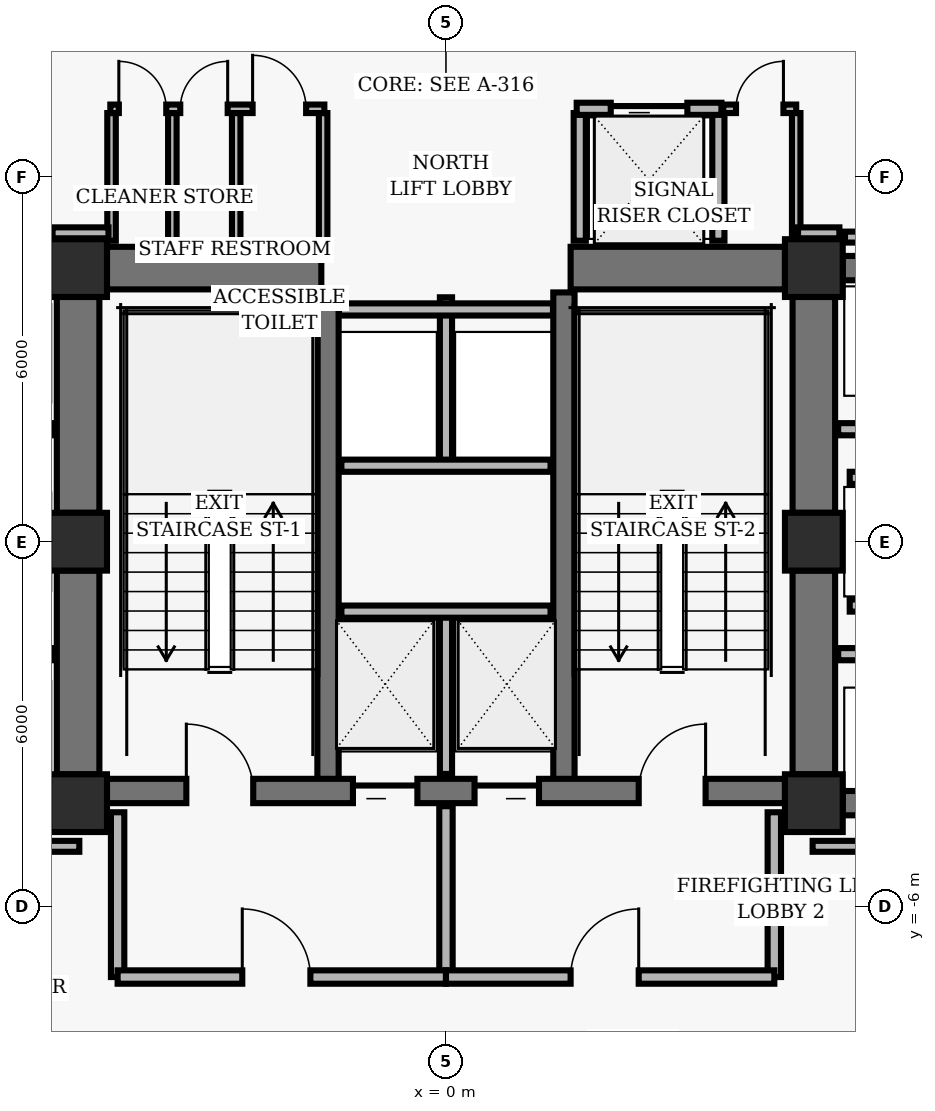
"""IFC4 building model, lengths in metres.
Left out: names, types, materials, properties, quantities, classifications, styles, units other than length and angle.
Written with IfcOpenShell. Run it as: python <this file> out.ifc"""

import sys

from ifc_helpers import new_model, si_unit, direction, frame, frame_2d, origin, origin_2d, place, context, subcontext, project, spatial, rectangle, hollow_rectangle, extrude, element, fill, save


model = new_model("IFC4")
c1 = context("Model", 3, precision=1e-05, world=origin(), true_north=direction((0.0, 1.0)))
c2 = subcontext(c1, "Body", "Model", "MODEL_VIEW")
j1 = project(units=[si_unit("LENGTHUNIT", "METRE"), si_unit("PLANEANGLEUNIT", "RADIAN")], contexts=[c1])
p1 = place(None, origin())
s1 = spatial("IfcSite", under=j1, at=p1, CompositionType="ELEMENT")
p2 = place(p1, origin())
s2 = spatial("IfcBuilding", under=s1, at=p2, CompositionType="ELEMENT")
p3 = place(p2, frame((0.0, 0.0, 52.96)))
s3 = spatial("IfcBuildingStorey", under=s2, at=p3, CompositionType="ELEMENT", Elevation=52.96)
for number, where, z_axis, x_axis in (
    (1, (-6.05, 4.5, 0.0), (0.0, 0.0, 1.0), (1.0, 0.0, 0.0)),
    (2, (6.05, 4.5, 0.0), (0.0, 0.0, 1.0), (1.0, 0.0, 0.0)),
    (3, (-6.05, 0.0, 0.0), (0.0, 0.0, 1.0), (1.0, 0.0, 0.0)),
    (4, (6.05, 0.0, 0.0), (0.0, 0.0, 1.0), (1.0, 0.0, 0.0)),
    (5, (-6.05, -4.3, 0.0), (0.0, 0.0, 1.0), (1.0, 0.0, 0.0)),
    (6, (6.05, -4.3, 0.0), (0.0, 0.0, 1.0), (1.0, 0.0, 0.0)),
):
    element("IfcColumn", number, at=place(p3, frame(where, z_axis=z_axis, x_axis=x_axis)), inside=s3, PredefinedType="COLUMN", context=c2, shape_type="SweptSolid", body=[
        extrude(hollow_rectangle(XDim=0.95, YDim=0.95, WallThickness=0.06, InnerFilletRadius=0.02, OuterFilletRadius=0.04, at=origin_2d()), origin(), (0.0, 0.0, 1.0), 3.36),
    ])
p4 = place(p3, frame((-6.05, 0.475, 0.0), z_axis=(0.0, 0.0, 1.0), x_axis=(0.0, 1.0, 0.0)))
e7 = element("IfcWall", 7, at=p4, inside=s3, PredefinedType="SHEAR", context=c2, shape_type="SweptSolid", body=[
    extrude(rectangle(XDim=3.55, YDim=0.7, at=frame_2d((1.775, 0.0))), origin(), (0.0, 0.0, 1.0), 3.098),
])
p5 = place(p3, frame((-6.05, -3.825, 0.0), z_axis=(0.0, 0.0, 1.0), x_axis=(0.0, 1.0, 0.0)))
e8 = element("IfcWall", 8, at=p5, inside=s3, PredefinedType="SHEAR", context=c2, shape_type="SweptSolid", body=[
    extrude(rectangle(XDim=3.35, YDim=0.7, at=frame_2d((1.675, 0.0))), origin(), (0.0, 0.0, 1.0), 3.098),
])
p6 = place(p3, frame((6.05, 0.475, 0.0), z_axis=(0.0, 0.0, 1.0), x_axis=(0.0, 1.0, 0.0)))
e9 = element("IfcWall", 9, at=p6, inside=s3, PredefinedType="SHEAR", context=c2, shape_type="SweptSolid", body=[
    extrude(rectangle(XDim=3.55, YDim=0.7, at=frame_2d((1.775, 0.0))), origin(), (0.0, 0.0, 1.0), 3.098),
])
p7 = place(p3, frame((6.05, -3.825, 0.0), z_axis=(0.0, 0.0, 1.0), x_axis=(0.0, 1.0, 0.0)))
e10 = element("IfcWall", 10, at=p7, inside=s3, PredefinedType="SHEAR", context=c2, shape_type="SweptSolid", body=[
    extrude(rectangle(XDim=3.35, YDim=0.7, at=frame_2d((1.675, 0.0))), origin(), (0.0, 0.0, 1.0), 3.098),
])
for number, where, z_axis, x_axis in (
    (11, (-1.94, -4.1, 0.0), (0.0, 0.0, 1.0), (0.0, 1.0, 0.0)),
    (12, (1.94, -4.1, 0.0), (0.0, 0.0, 1.0), (0.0, 1.0, 0.0)),
):
    element("IfcWall", number, at=place(p3, frame(where, z_axis=z_axis, x_axis=x_axis)), inside=s3, PredefinedType="SHEAR", context=c2, shape_type="SweptSolid", body=[
        extrude(rectangle(XDim=8.2, YDim=0.35, at=frame_2d((4.1, 0.0))), origin(), (0.0, 0.0, 1.0), 3.098),
    ])
p8 = place(p3, frame((-5.575, -4.1, 0.0), z_axis=(0.0, 0.0, 1.0), x_axis=(1.0, 0.0, 0.0)))
e13 = element("IfcWall", 13, at=p8, inside=s3, PredefinedType="SHEAR", context=c2, shape_type="SweptSolid", body=[
    extrude(rectangle(XDim=11.15, YDim=0.4, at=frame_2d((5.575, 0.0))), origin(), (0.0, 0.0, 1.0), 3.098),
])
p9 = place(p8, frame((1.305, 0.0, 0.0)))
e14 = element("IfcOpeningElement", 14, at=p9, cuts=e13, PredefinedType="OPENING", context=c2, shape_type="SweptSolid", body=[
    extrude(rectangle(XDim=1.1, YDim=2.04, at=frame_2d((0.55, 1.02))), frame((0.0, 0.21, 0.0), z_axis=(0.0, -1.0, 0.0), x_axis=(1.0, 0.0, 0.0)), (0.0, 0.0, 1.0), 0.42),
])
p10 = place(p8, frame((8.745, 0.0, 0.0)))
e15 = element("IfcOpeningElement", 15, at=p10, cuts=e13, PredefinedType="OPENING", context=c2, shape_type="SweptSolid", body=[
    extrude(rectangle(XDim=1.1, YDim=2.04, at=frame_2d((0.55, 1.02))), frame((0.0, 0.21, 0.0), z_axis=(0.0, -1.0, 0.0), x_axis=(1.0, 0.0, 0.0)), (0.0, 0.0, 1.0), 0.42),
])
p11 = place(p8, frame((4.045, 0.0, 0.0)))
e16 = element("IfcOpeningElement", 16, at=p11, cuts=e13, PredefinedType="OPENING", context=c2, shape_type="SweptSolid", body=[
    extrude(rectangle(XDim=1.06, YDim=2.04, at=frame_2d((0.53, 1.02))), frame((0.0, 0.21, 0.0), z_axis=(0.0, -1.0, 0.0), x_axis=(1.0, 0.0, 0.0)), (0.0, 0.0, 1.0), 0.42),
])
p12 = place(p8, frame((6.045, 0.0, 0.0)))
e17 = element("IfcOpeningElement", 17, at=p12, cuts=e13, PredefinedType="OPENING", context=c2, shape_type="SweptSolid", body=[
    extrude(rectangle(XDim=1.06, YDim=2.04, at=frame_2d((0.53, 1.02))), frame((0.0, 0.21, 0.0), z_axis=(0.0, -1.0, 0.0), x_axis=(1.0, 0.0, 0.0)), (0.0, 0.0, 1.0), 0.42),
])
for number, where, z_axis, x_axis in (
    (18, (-5.575, 4.5, 0.0), (0.0, 0.0, 1.0), (1.0, 0.0, 0.0)),
    (19, (2.05, 4.5, 0.0), (0.0, 0.0, 1.0), (1.0, 0.0, 0.0)),
):
    element("IfcWall", number, at=place(p3, frame(where, z_axis=z_axis, x_axis=x_axis)), inside=s3, PredefinedType="SHEAR", context=c2, shape_type="SweptSolid", body=[
        extrude(rectangle(XDim=3.525, YDim=0.7, at=frame_2d((1.762, 0.0))), origin(), (0.0, 0.0, 1.0), 3.098),
    ])
for number, where, z_axis, x_axis in (
    (20, (6.525, 4.5, 0.0), (0.0, 0.0, 1.0), (1.0, 0.0, 0.0)),
    (21, (6.525, -4.3, 0.0), (0.0, 0.0, 1.0), (1.0, 0.0, 0.0)),
):
    element("IfcWall", number, at=place(p3, frame(where, z_axis=z_axis, x_axis=x_axis)), inside=s3, PredefinedType="SHEAR", context=c2, shape_type="SweptSolid", body=[
        extrude(rectangle(XDim=1.95, YDim=0.4, at=frame_2d((0.975, 0.0))), origin(), (0.0, 0.0, 1.0), 3.098),
    ])
p13 = place(p3, frame((0.0, -3.82, 0.0), z_axis=(0.0, 0.0, 1.0), x_axis=(0.0, 1.0, 0.0)))
e22 = element("IfcWall", 22, at=p13, inside=s3, PredefinedType="PARTITIONING", context=c2, shape_type="SweptSolid", body=[
    extrude(rectangle(XDim=2.67, YDim=0.2, at=frame_2d((1.335, 0.0))), origin(), (0.0, 0.0, 1.0), 3.073),
])
p14 = place(p3, frame((-1.72, -1.15, 0.0), z_axis=(0.0, 0.0, 1.0), x_axis=(1.0, 0.0, 0.0)))
e23 = element("IfcWall", 23, at=p14, inside=s3, PredefinedType="PARTITIONING", context=c2, shape_type="SweptSolid", body=[
    extrude(rectangle(XDim=3.44, YDim=0.2, at=frame_2d((1.72, 0.0))), origin(), (0.0, 0.0, 1.0), 3.073),
])
for number, where, z_axis, x_axis in (
    (24, (-5.4, -7.16, 0.0), (0.0, 0.0, 1.0), (0.0, 1.0, 0.0)),
    (25, (5.4, -7.16, 0.0), (0.0, 0.0, 1.0), (0.0, 1.0, 0.0)),
):
    element("IfcWall", number, at=place(p3, frame(where, z_axis=z_axis, x_axis=x_axis)), inside=s3, PredefinedType="PARTITIONING", context=c2, shape_type="SweptSolid", body=[
        extrude(rectangle(XDim=2.71, YDim=0.22, at=frame_2d((1.355, 0.0))), origin(), (0.0, 0.0, 1.0), 3.073),
    ])
p15 = place(p3, frame((0.0, -7.16, 0.0), z_axis=(0.0, 0.0, 1.0), x_axis=(0.0, 1.0, 0.0)))
e26 = element("IfcWall", 26, at=p15, inside=s3, PredefinedType="PARTITIONING", context=c2, shape_type="SweptSolid", body=[
    extrude(rectangle(XDim=2.81, YDim=0.22, at=frame_2d((1.405, 0.0))), origin(), (0.0, 0.0, 1.0), 3.073),
])
p16 = place(p3, frame((-5.4, -7.16, 0.0), z_axis=(0.0, 0.0, 1.0), x_axis=(1.0, 0.0, 0.0)))
e27 = element("IfcWall", 27, at=p16, inside=s3, PredefinedType="PARTITIONING", context=c2, shape_type="SweptSolid", body=[
    extrude(rectangle(XDim=5.4, YDim=0.22, at=frame_2d((2.7, 0.0))), origin(), (0.0, 0.0, 1.0), 2.587),
])
p17 = place(p16, frame((2.05, 0.0, 0.0)))
e28 = element("IfcOpeningElement", 28, at=p17, cuts=e27, PredefinedType="OPENING", context=c2, shape_type="SweptSolid", body=[
    extrude(rectangle(XDim=1.12, YDim=2.02, at=frame_2d((0.56, 1.01))), frame((0.0, 0.12, 0.0), z_axis=(0.0, -1.0, 0.0), x_axis=(1.0, 0.0, 0.0)), (0.0, 0.0, 1.0), 0.24),
])
p18 = place(p3, frame((0.0, -7.16, 0.0), z_axis=(0.0, 0.0, 1.0), x_axis=(1.0, 0.0, 0.0)))
e29 = element("IfcWall", 29, at=p18, inside=s3, PredefinedType="PARTITIONING", context=c2, shape_type="SweptSolid", body=[
    extrude(rectangle(XDim=5.4, YDim=0.22, at=frame_2d((2.7, 0.0))), origin(), (0.0, 0.0, 1.0), 2.587),
])
p19 = place(p18, frame((2.05, 0.0, 0.0)))
e30 = element("IfcOpeningElement", 30, at=p19, cuts=e29, PredefinedType="OPENING", context=c2, shape_type="SweptSolid", body=[
    extrude(rectangle(XDim=1.12, YDim=2.02, at=frame_2d((0.56, 1.01))), frame((0.0, 0.12, 0.0), z_axis=(0.0, -1.0, 0.0), x_axis=(1.0, 0.0, 0.0)), (0.0, 0.0, 1.0), 0.24),
])
p20 = place(p3, frame((0.0, 1.25, 0.0), z_axis=(0.0, 0.0, 1.0), x_axis=(0.0, 1.0, 0.0)))
e31 = element("IfcWall", 31, at=p20, inside=s3, PredefinedType="PARTITIONING", context=c2, shape_type="SweptSolid", body=[
    extrude(rectangle(XDim=2.77, YDim=0.2, at=frame_2d((1.385, 0.0))), origin(), (0.0, 0.0, 1.0), 3.073),
])
p21 = place(p3, frame((-1.72, 1.25, 0.0), z_axis=(0.0, 0.0, 1.0), x_axis=(1.0, 0.0, 0.0)))
e32 = element("IfcWall", 32, at=p21, inside=s3, PredefinedType="PARTITIONING", context=c2, shape_type="SweptSolid", body=[
    extrude(rectangle(XDim=3.44, YDim=0.2, at=frame_2d((1.72, 0.0))), origin(), (0.0, 0.0, 1.0), 3.073),
])
p22 = place(p3, frame((-1.76, 3.82, 0.0), z_axis=(0.0, 0.0, 1.0), x_axis=(1.0, 0.0, 0.0)))
e33 = element("IfcWall", 33, at=p22, inside=s3, PredefinedType="PARTITIONING", context=c2, shape_type="SweptSolid", body=[
    extrude(rectangle(XDim=3.52, YDim=0.2, at=frame_2d((1.76, 0.0))), origin(), (0.0, 0.0, 1.0), 3.073),
])
for number, where, z_axis, x_axis in (
    (34, (2.2, 4.95, 0.0), (0.0, 0.0, 1.0), (0.0, 1.0, 0.0)),
    (35, (4.48, 4.95, 0.0), (0.0, 0.0, 1.0), (0.0, 1.0, 0.0)),
):
    element("IfcWall", number, at=place(p3, frame(where, z_axis=z_axis, x_axis=x_axis)), inside=s3, PredefinedType="PARTITIONING", context=c2, shape_type="SweptSolid", body=[
        extrude(rectangle(XDim=2.1, YDim=0.2, at=frame_2d((1.05, 0.0))), origin(), (0.0, 0.0, 1.0), 3.073),
    ])
p23 = place(p3, frame((2.15, 7.12, 0.0), z_axis=(0.0, 0.0, 1.0), x_axis=(1.0, 0.0, 0.0)))
e36 = element("IfcWall", 36, at=p23, inside=s3, PredefinedType="PARTITIONING", context=c2, shape_type="SweptSolid", body=[
    extrude(rectangle(XDim=2.38, YDim=0.2, at=frame_2d((1.19, 0.0))), origin(), (0.0, 0.0, 1.0), 2.587),
])
p24 = place(p23, frame((0.56, 0.0, 0.0)))
e37 = element("IfcOpeningElement", 37, at=p24, cuts=e36, PredefinedType="OPENING", context=c2, shape_type="SweptSolid", body=[
    extrude(rectangle(XDim=1.26, YDim=2.06, at=frame_2d((0.63, 1.03))), frame((0.0, 0.11, 0.0), z_axis=(0.0, -1.0, 0.0), x_axis=(1.0, 0.0, 0.0)), (0.0, 0.0, 1.0), 0.22),
])
for number, where, z_axis, x_axis in (
    (38, (-5.5, 4.95, 0.0), (0.0, 0.0, 1.0), (0.0, 1.0, 0.0)),
    (39, (-4.5, 4.95, 0.0), (0.0, 0.0, 1.0), (0.0, 1.0, 0.0)),
    (40, (-3.45, 4.95, 0.0), (0.0, 0.0, 1.0), (0.0, 1.0, 0.0)),
    (41, (-2.02, 4.95, 0.0), (0.0, 0.0, 1.0), (0.0, 1.0, 0.0)),
):
    element("IfcWall", number, at=place(p3, frame(where, z_axis=z_axis, x_axis=x_axis)), inside=s3, PredefinedType="PARTITIONING", context=c2, shape_type="SweptSolid", body=[
        extrude(rectangle(XDim=2.1, YDim=0.14, at=frame_2d((1.05, 0.0))), origin(), (0.0, 0.0, 1.0), 3.073),
    ])
p25 = place(p3, frame((-5.52, 7.12, 0.0), z_axis=(0.0, 0.0, 1.0), x_axis=(1.0, 0.0, 0.0)))
e42 = element("IfcWall", 42, at=p25, inside=s3, PredefinedType="PARTITIONING", context=c2, shape_type="SweptSolid", body=[
    extrude(rectangle(XDim=3.52, YDim=0.14, at=frame_2d((1.76, 0.0))), origin(), (0.0, 0.0, 1.0), 3.073),
])
p26 = place(p25, frame((0.14, 0.0, 0.0)))
e43 = element("IfcOpeningElement", 43, at=p26, cuts=e42, PredefinedType="OPENING", context=c2, shape_type="SweptSolid", body=[
    extrude(rectangle(XDim=0.78, YDim=2.01, at=frame_2d((0.39, 1.005))), frame((0.0, 0.08, 0.0), z_axis=(0.0, -1.0, 0.0), x_axis=(1.0, 0.0, 0.0)), (0.0, 0.0, 1.0), 0.16),
])
p27 = place(p25, frame((1.15, 0.0, 0.0)))
e44 = element("IfcOpeningElement", 44, at=p27, cuts=e42, PredefinedType="OPENING", context=c2, shape_type="SweptSolid", body=[
    extrude(rectangle(XDim=0.78, YDim=2.01, at=frame_2d((0.39, 1.005))), frame((0.0, 0.08, 0.0), z_axis=(0.0, -1.0, 0.0), x_axis=(1.0, 0.0, 0.0)), (0.0, 0.0, 1.0), 0.16),
])
p28 = place(p25, frame((2.34, 0.0, 0.0)))
e45 = element("IfcOpeningElement", 45, at=p28, cuts=e42, PredefinedType="OPENING", context=c2, shape_type="SweptSolid", body=[
    extrude(rectangle(XDim=0.88, YDim=2.02, at=frame_2d((0.44, 1.01))), frame((0.0, 0.08, 0.0), z_axis=(0.0, -1.0, 0.0), x_axis=(1.0, 0.0, 0.0)), (0.0, 0.0, 1.0), 0.16),
])
p29 = place(p3, frame((5.76, 4.95, 0.0), z_axis=(0.0, 0.0, 1.0), x_axis=(0.0, 1.0, 0.0)))
e46 = element("IfcWall", 46, at=p29, inside=s3, PredefinedType="PARTITIONING", context=c2, shape_type="SweptSolid", body=[
    extrude(rectangle(XDim=2.1, YDim=0.14, at=frame_2d((1.05, 0.0))), origin(), (0.0, 0.0, 1.0), 3.073),
])
p30 = place(p3, frame((4.56, 7.12, 0.0), z_axis=(0.0, 0.0, 1.0), x_axis=(1.0, 0.0, 0.0)))
e47 = element("IfcWall", 47, at=p30, inside=s3, PredefinedType="PARTITIONING", context=c2, shape_type="SweptSolid", body=[
    extrude(rectangle(XDim=1.2, YDim=0.14, at=frame_2d((0.6, 0.0))), origin(), (0.0, 0.0, 1.0), 2.587),
])
p31 = place(p30, frame((0.21, 0.0, 0.0)))
e48 = element("IfcOpeningElement", 48, at=p31, cuts=e47, PredefinedType="OPENING", context=c2, shape_type="SweptSolid", body=[
    extrude(rectangle(XDim=0.78, YDim=2.01, at=frame_2d((0.39, 1.005))), frame((0.0, 0.08, 0.0), z_axis=(0.0, -1.0, 0.0), x_axis=(1.0, 0.0, 0.0)), (0.0, 0.0, 1.0), 0.16),
])
for number, where, z_axis, x_axis in (
    (49, (-8.55, -1.85, 0.0), (0.0, 0.0, 1.0), (1.0, 0.0, 0.0)),
    (50, (-8.55, 1.85, 0.0), (0.0, 0.0, 1.0), (1.0, 0.0, 0.0)),
    (51, (6.45, -1.85, 0.0), (0.0, 0.0, 1.0), (1.0, 0.0, 0.0)),
    (52, (6.45, 1.85, 0.0), (0.0, 0.0, 1.0), (1.0, 0.0, 0.0)),
):
    element("IfcWall", number, at=place(p3, frame(where, z_axis=z_axis, x_axis=x_axis)), inside=s3, PredefinedType="PARTITIONING", context=c2, shape_type="SweptSolid", body=[
        extrude(rectangle(XDim=2.1, YDim=0.2, at=frame_2d((1.05, 0.0))), origin(), (0.0, 0.0, 1.0), 3.073),
    ])
for number, where, z_axis, x_axis in (
    (53, (6.64, -1.05, 0.0), (0.0, 0.0, 1.0), (1.0, 0.0, 0.0)),
    (54, (6.64, 1.05, 0.0), (0.0, 0.0, 1.0), (1.0, 0.0, 0.0)),
):
    element("IfcWall", number, at=place(p3, frame(where, z_axis=z_axis, x_axis=x_axis)), inside=s3, PredefinedType="PARTITIONING", context=c2, shape_type="SweptSolid", body=[
        extrude(rectangle(XDim=1.91, YDim=0.2, at=frame_2d((0.955, 0.0))), origin(), (0.0, 0.0, 1.0), 3.073),
    ])
for number, where, z_axis, x_axis in (
    (55, (-9.37, -5.01, 0.0), (0.0, 0.0, 1.0), (1.0, 0.0, 0.0)),
    (56, (6.03, -5.01, 0.0), (0.0, 0.0, 1.0), (1.0, 0.0, 0.0)),
):
    element("IfcWall", number, at=place(p3, frame(where, z_axis=z_axis, x_axis=x_axis)), inside=s3, PredefinedType="PARTITIONING", context=c2, shape_type="SweptSolid", body=[
        extrude(rectangle(XDim=3.34, YDim=0.18, at=frame_2d((1.67, 0.0))), origin(), (0.0, 0.0, 1.0), 3.073),
    ])
p32 = place(p3, frame((9.37, 5.01, 0.0), z_axis=(0.0, 0.0, 1.0), x_axis=(-1.0, 0.0, 0.0)))
e57 = element("IfcWall", 57, at=p32, inside=s3, PredefinedType="PARTITIONING", context=c2, shape_type="SweptSolid", body=[
    extrude(rectangle(XDim=2.808, YDim=0.18, at=frame_2d((1.404, 0.0))), origin(), (0.0, 0.0, 1.0), 3.073),
])
p33 = place(p3, frame((6.47, 5.08, 0.0), z_axis=(0.0, 0.0, 1.0), x_axis=(-1.0, 0.0, 0.0)))
e58 = element("IfcWall", 58, at=p33, inside=s3, PredefinedType="PARTITIONING", context=c2, shape_type="SweptSolid", body=[
    extrude(rectangle(XDim=0.68, YDim=0.18, at=frame_2d((0.34, 0.0))), origin(), (0.0, 0.0, 1.0), 3.073),
])
p34 = place(p3, frame((-5.55, 5.08, 0.0), z_axis=(0.0, 0.0, 1.0), x_axis=(-1.0, 0.0, 0.0)))
e59 = element("IfcWall", 59, at=p34, inside=s3, PredefinedType="PARTITIONING", context=c2, shape_type="SweptSolid", body=[
    extrude(rectangle(XDim=0.92, YDim=0.18, at=frame_2d((0.46, 0.0))), origin(), (0.0, 0.0, 1.0), 3.073),
])
p35 = place(p9, origin())
e60 = element("IfcDoor", 60, at=p35, inside=s3, OperationType="SINGLE_SWING_LEFT", PredefinedType="DOOR", context=c2, shape_type="SweptSolid", body=[
    extrude(rectangle(XDim=1.1, YDim=2.04, at=frame_2d((0.55, 1.02))), frame((0.0, 0.025, 0.0), z_axis=(0.0, -1.0, 0.0), x_axis=(1.0, 0.0, 0.0)), (0.0, 0.0, 1.0), 0.05),
])
fill(e14, e60)
p36 = place(p10, origin())
e61 = element("IfcDoor", 61, at=p36, inside=s3, OperationType="SINGLE_SWING_RIGHT", PredefinedType="DOOR", context=c2, shape_type="SweptSolid", body=[
    extrude(rectangle(XDim=1.1, YDim=2.04, at=frame_2d((0.55, 1.02))), frame((0.0, 0.025, 0.0), z_axis=(0.0, -1.0, 0.0), x_axis=(1.0, 0.0, 0.0)), (0.0, 0.0, 1.0), 0.05),
])
fill(e15, e61)
p37 = place(p11, origin())
e62 = element("IfcDoor", 62, at=p37, inside=s3, OperationType="SLIDING_TO_LEFT", PredefinedType="DOOR", context=c2, shape_type="SweptSolid", body=[
    extrude(rectangle(XDim=1.06, YDim=2.04, at=frame_2d((0.53, 1.02))), frame((0.0, 0.025, 0.0), z_axis=(0.0, -1.0, 0.0), x_axis=(1.0, 0.0, 0.0)), (0.0, 0.0, 1.0), 0.05),
])
fill(e16, e62)
p38 = place(p12, origin())
e63 = element("IfcDoor", 63, at=p38, inside=s3, OperationType="SLIDING_TO_RIGHT", PredefinedType="DOOR", context=c2, shape_type="SweptSolid", body=[
    extrude(rectangle(XDim=1.06, YDim=2.04, at=frame_2d((0.53, 1.02))), frame((0.0, 0.025, 0.0), z_axis=(0.0, -1.0, 0.0), x_axis=(1.0, 0.0, 0.0)), (0.0, 0.0, 1.0), 0.05),
])
fill(e17, e63)
p39 = place(p17, origin())
e64 = element("IfcDoor", 64, at=p39, inside=s3, OperationType="SINGLE_SWING_LEFT", PredefinedType="DOOR", context=c2, shape_type="SweptSolid", body=[
    extrude(rectangle(XDim=1.12, YDim=2.02, at=frame_2d((0.56, 1.01))), frame((0.0, 0.025, 0.0), z_axis=(0.0, -1.0, 0.0), x_axis=(1.0, 0.0, 0.0)), (0.0, 0.0, 1.0), 0.05),
])
fill(e28, e64)
p40 = place(p19, origin())
e65 = element("IfcDoor", 65, at=p40, inside=s3, OperationType="SINGLE_SWING_RIGHT", PredefinedType="DOOR", context=c2, shape_type="SweptSolid", body=[
    extrude(rectangle(XDim=1.12, YDim=2.02, at=frame_2d((0.56, 1.01))), frame((0.0, 0.025, 0.0), z_axis=(0.0, -1.0, 0.0), x_axis=(1.0, 0.0, 0.0)), (0.0, 0.0, 1.0), 0.05),
])
fill(e30, e65)
p41 = place(p24, origin())
e66 = element("IfcDoor", 66, at=p41, inside=s3, OperationType="SLIDING_TO_LEFT", PredefinedType="DOOR", context=c2, shape_type="SweptSolid", body=[
    extrude(rectangle(XDim=1.26, YDim=2.06, at=frame_2d((0.63, 1.03))), frame((0.0, 0.025, 0.0), z_axis=(0.0, -1.0, 0.0), x_axis=(1.0, 0.0, 0.0)), (0.0, 0.0, 1.0), 0.05),
])
fill(e37, e66)
p42 = place(p26, origin())
e67 = element("IfcDoor", 67, at=p42, inside=s3, OperationType="SINGLE_SWING_LEFT", PredefinedType="DOOR", context=c2, shape_type="SweptSolid", body=[
    extrude(rectangle(XDim=0.78, YDim=2.01, at=frame_2d((0.39, 1.005))), frame((0.0, 0.025, 0.0), z_axis=(0.0, -1.0, 0.0), x_axis=(1.0, 0.0, 0.0)), (0.0, 0.0, 1.0), 0.05),
])
fill(e43, e67)
p43 = place(p27, origin())
e68 = element("IfcDoor", 68, at=p43, inside=s3, OperationType="SINGLE_SWING_RIGHT", PredefinedType="DOOR", context=c2, shape_type="SweptSolid", body=[
    extrude(rectangle(XDim=0.78, YDim=2.01, at=frame_2d((0.39, 1.005))), frame((0.0, 0.025, 0.0), z_axis=(0.0, -1.0, 0.0), x_axis=(1.0, 0.0, 0.0)), (0.0, 0.0, 1.0), 0.05),
])
fill(e44, e68)
p44 = place(p28, origin())
e69 = element("IfcDoor", 69, at=p44, inside=s3, OperationType="SINGLE_SWING_LEFT", PredefinedType="DOOR", context=c2, shape_type="SweptSolid", body=[
    extrude(rectangle(XDim=0.88, YDim=2.02, at=frame_2d((0.44, 1.01))), frame((0.0, 0.025, 0.0), z_axis=(0.0, -1.0, 0.0), x_axis=(1.0, 0.0, 0.0)), (0.0, 0.0, 1.0), 0.05),
])
fill(e45, e69)
p45 = place(p31, origin())
e70 = element("IfcDoor", 70, at=p45, inside=s3, OperationType="SINGLE_SWING_RIGHT", PredefinedType="DOOR", context=c2, shape_type="SweptSolid", body=[
    extrude(rectangle(XDim=0.78, YDim=2.01, at=frame_2d((0.39, 1.005))), frame((0.0, 0.025, 0.0), z_axis=(0.0, -1.0, 0.0), x_axis=(1.0, 0.0, 0.0)), (0.0, 0.0, 1.0), 0.05),
])
fill(e48, e70)
save(model, sys.argv[1])
